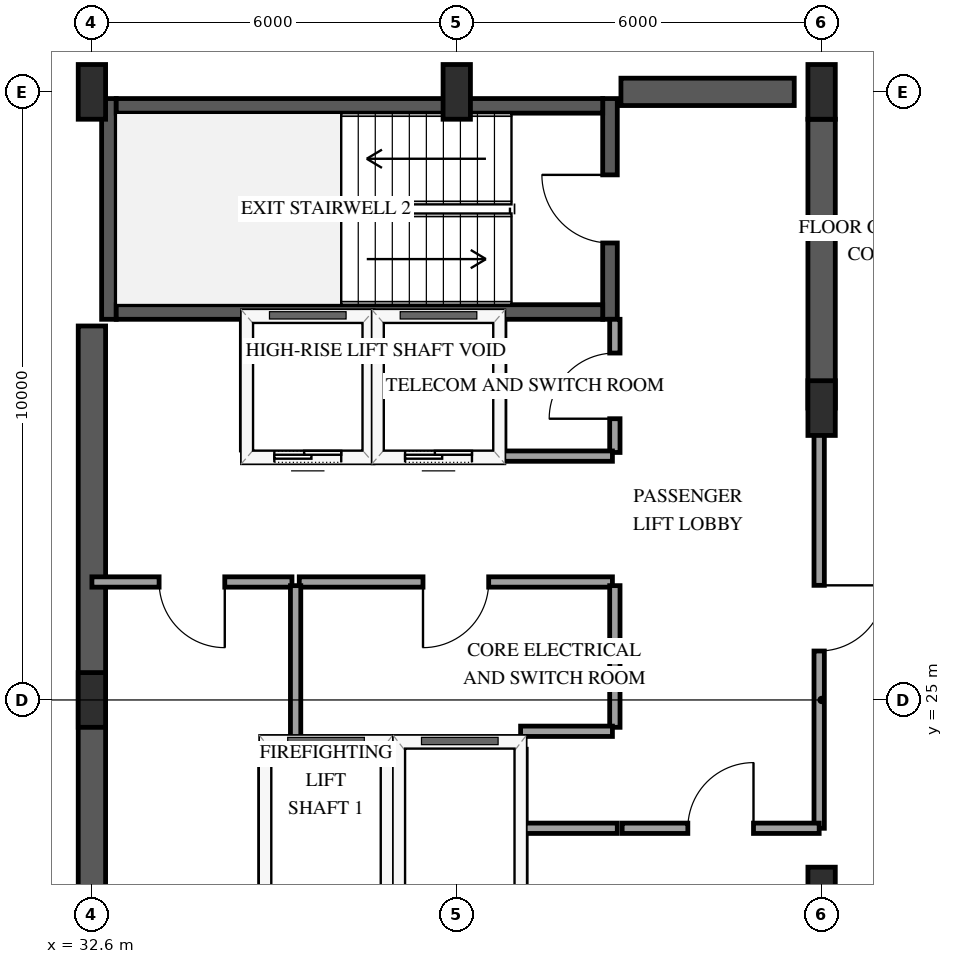
"""IFC4 building model, lengths in metres.
Left out: names, types, materials, properties, quantities, classifications, styles, units other than length and angle.
Written with IfcOpenShell. Run it as: python <this file> out.ifc"""

import sys

from ifc_helpers import new_model, si_unit, direction, frame, frame_2d, origin, origin_2d, place, context, subcontext, project, spatial, rectangle, extrude, element, fill, save


model = new_model("IFC4")
c1 = context("Model", 3, precision=1e-05, world=origin(), true_north=direction((0.0, 1.0)))
c2 = subcontext(c1, "Body", "Model", "MODEL_VIEW")
j1 = project(units=[si_unit("LENGTHUNIT", "METRE"), si_unit("PLANEANGLEUNIT", "RADIAN")], contexts=[c1])
p1 = place(None, origin())
s1 = spatial("IfcSite", under=j1, at=p1, CompositionType="ELEMENT")
p2 = place(p1, origin())
s2 = spatial("IfcBuilding", under=s1, at=p2, CompositionType="ELEMENT")
p3 = place(p2, frame((0.0, 0.0, 250.0)))
s3 = spatial("IfcBuildingStorey", under=s2, at=p3, CompositionType="ELEMENT", Elevation=250.0)
p4 = place(p3, frame((32.88, 31.26, 0.0), z_axis=(0.0, 0.0, 1.0), x_axis=(0.0, 1.0, 0.0)))
e1 = element("IfcWall", 1, at=p4, inside=s3, PredefinedType="SHEAR", context=c2, shape_type="SweptSolid", body=[
    extrude(rectangle(XDim=3.63, YDim=0.24, at=frame_2d((1.815, 0.0))), origin(), (0.0, 0.0, 1.0), 3.75),
])
p5 = place(p3, frame((41.12, 31.26, 0.0), z_axis=(0.0, 0.0, 1.0), x_axis=(0.0, 1.0, 0.0)))
e2 = element("IfcWall", 2, at=p5, inside=s3, PredefinedType="SHEAR", context=c2, shape_type="SweptSolid", body=[
    extrude(rectangle(XDim=3.63, YDim=0.24, at=frame_2d((1.815, 0.0))), origin(), (0.0, 0.0, 1.0), 3.75),
])
p6 = place(p5, frame((1.255, 0.0, 0.0)))
e3 = element("IfcOpeningElement", 3, at=p6, cuts=e2, PredefinedType="OPENING", context=c2, shape_type="SweptSolid", body=[
    extrude(rectangle(XDim=1.12, YDim=2.15, at=frame_2d((0.56, 1.075))), frame((0.0, 0.13, 0.0), z_axis=(0.0, -1.0, 0.0), x_axis=(1.0, 0.0, 0.0)), (0.0, 0.0, 1.0), 0.26),
])
for number, where, z_axis, x_axis in (
    (4, (33.0, 31.38, 0.0), (0.0, 0.0, 1.0), (1.0, 0.0, 0.0)),
    (5, (33.0, 34.77, 0.0), (0.0, 0.0, 1.0), (1.0, 0.0, 0.0)),
):
    element("IfcWall", number, at=place(p3, frame(where, z_axis=z_axis, x_axis=x_axis)), inside=s3, PredefinedType="SHEAR", context=c2, shape_type="SweptSolid", body=[
        extrude(rectangle(XDim=8.0, YDim=0.24, at=frame_2d((4.0, 0.0))), origin(), (0.0, 0.0, 1.0), 3.75),
    ])
p7 = place(p3, frame((32.6, 18.85, 0.0), z_axis=(0.0, 0.0, 1.0), x_axis=(0.0, 1.0, 0.0)))
e6 = element("IfcWall", 6, at=p7, inside=s3, PredefinedType="SHEAR", context=c2, shape_type="SweptSolid", body=[
    extrude(rectangle(XDim=12.3, YDim=0.45, at=frame_2d((6.15, 0.0))), origin(), (0.0, 0.0, 1.0), 3.75),
])
p8 = place(p3, frame((41.3, 35.0, 0.0), z_axis=(0.0, 0.0, 1.0), x_axis=(1.0, 0.0, 0.0)))
e7 = element("IfcWall", 7, at=p8, inside=s3, PredefinedType="SHEAR", context=c2, shape_type="SweptSolid", body=[
    extrude(rectangle(XDim=2.85, YDim=0.45, at=frame_2d((1.425, 0.0))), origin(), (0.0, 0.0, 1.0), 3.75),
])
p9 = place(p3, frame((44.6, 29.8, 0.0), z_axis=(0.0, 0.0, 1.0), x_axis=(0.0, 1.0, 0.0)))
e8 = element("IfcWall", 8, at=p9, inside=s3, PredefinedType="SHEAR", context=c2, shape_type="SweptSolid", body=[
    extrude(rectangle(XDim=4.75, YDim=0.45, at=frame_2d((2.375, 0.0))), origin(), (0.0, 0.0, 1.0), 3.75),
])
for number, where, z_axis, x_axis in (
    (9, (32.6, 25.0, 0.0), (0.0, 0.0, 1.0), (1.0, 0.0, 0.0)),
    (10, (32.6, 35.0, 0.0), (0.0, 0.0, 1.0), (1.0, 0.0, 0.0)),
    (11, (38.6, 35.0, 0.0), (0.0, 0.0, 1.0), (1.0, 0.0, 0.0)),
    (12, (44.6, 21.8, 0.0), (0.0, 0.0, 1.0), (1.0, 0.0, 0.0)),
    (13, (44.6, 29.8, 0.0), (0.0, 0.0, 1.0), (1.0, 0.0, 0.0)),
    (14, (44.6, 35.0, 0.0), (0.0, 0.0, 1.0), (1.0, 0.0, 0.0)),
):
    element("IfcColumn", number, at=place(p3, frame(where, z_axis=z_axis, x_axis=x_axis)), inside=s3, PredefinedType="PILASTER", context=c2, shape_type="SweptSolid", body=[
        extrude(rectangle(XDim=0.45, YDim=0.9, at=origin_2d()), origin(), (0.0, 0.0, 1.0), 3.75),
    ])
p10 = place(p3, frame((35.45, 24.3, 0.0), z_axis=(0.0, 0.0, 1.0), x_axis=(1.0, 0.0, 0.0)))
e15 = element("IfcWall", 15, at=p10, inside=s3, PredefinedType="SOLIDWALL", context=c2, shape_type="SweptSolid", body=[
    extrude(rectangle(XDim=2.0, YDim=0.185, at=frame_2d((1.0, 0.0))), origin(), (0.0, 0.0, 1.0), 2.824),
])
for number, where, z_axis, x_axis in (
    (16, (35.45, 21.81, 0.0), (0.0, 0.0, 1.0), (0.0, 1.0, 0.0)),
    (17, (37.45, 21.81, 0.0), (0.0, 0.0, 1.0), (0.0, 1.0, 0.0)),
):
    element("IfcWall", number, at=place(p3, frame(where, z_axis=z_axis, x_axis=x_axis)), inside=s3, PredefinedType="SOLIDWALL", context=c2, shape_type="SweptSolid", body=[
        extrude(rectangle(XDim=2.38, YDim=0.185, at=frame_2d((1.19, 0.0))), origin(), (0.0, 0.0, 1.0), 3.45),
    ])
p11 = place(p3, frame((37.65, 24.3, 0.0), z_axis=(0.0, 0.0, 1.0), x_axis=(1.0, 0.0, 0.0)))
e18 = element("IfcWall", 18, at=p11, inside=s3, PredefinedType="SOLIDWALL", context=c2, shape_type="SweptSolid", body=[
    extrude(rectangle(XDim=2.0, YDim=0.185, at=frame_2d((1.0, 0.0))), origin(), (0.0, 0.0, 1.0), 2.824),
])
p12 = place(p3, frame((39.65, 21.81, 0.0), z_axis=(0.0, 0.0, 1.0), x_axis=(0.0, 1.0, 0.0)))
e19 = element("IfcWall", 19, at=p12, inside=s3, PredefinedType="SOLIDWALL", context=c2, shape_type="SweptSolid", body=[
    extrude(rectangle(XDim=2.38, YDim=0.185, at=frame_2d((1.19, 0.0))), origin(), (0.0, 0.0, 1.0), 3.45),
])
p13 = place(p3, frame((35.15, 29.0, 0.0), z_axis=(0.0, 0.0, 1.0), x_axis=(1.0, 0.0, 0.0)))
e20 = element("IfcWall", 20, at=p13, inside=s3, PredefinedType="SOLIDWALL", context=c2, shape_type="SweptSolid", body=[
    extrude(rectangle(XDim=2.0, YDim=0.185, at=frame_2d((1.0, 0.0))), origin(), (0.0, 0.0, 1.0), 3.45),
])
p14 = place(p13, frame((0.45, 0.0, 0.0)))
e21 = element("IfcOpeningElement", 21, at=p14, cuts=e20, PredefinedType="OPENING", context=c2, shape_type="SweptSolid", body=[
    extrude(rectangle(XDim=1.1, YDim=2.15, at=frame_2d((0.55, 1.075))), frame((0.0, 0.103, 0.0), z_axis=(0.0, -1.0, 0.0), x_axis=(1.0, 0.0, 0.0)), (0.0, 0.0, 1.0), 0.205),
])
for number, where, z_axis, x_axis in (
    (22, (35.15, 29.11, 0.0), (0.0, 0.0, 1.0), (0.0, 1.0, 0.0)),
    (23, (37.15, 29.11, 0.0), (0.0, 0.0, 1.0), (0.0, 1.0, 0.0)),
):
    element("IfcWall", number, at=place(p3, frame(where, z_axis=z_axis, x_axis=x_axis)), inside=s3, PredefinedType="SOLIDWALL", context=c2, shape_type="SweptSolid", body=[
        extrude(rectangle(XDim=2.1, YDim=0.185, at=frame_2d((1.05, 0.0))), origin(), (0.0, 0.0, 1.0), 3.45),
    ])
p15 = place(p3, frame((37.3, 29.0, 0.0), z_axis=(0.0, 0.0, 1.0), x_axis=(1.0, 0.0, 0.0)))
e24 = element("IfcWall", 24, at=p15, inside=s3, PredefinedType="SOLIDWALL", context=c2, shape_type="SweptSolid", body=[
    extrude(rectangle(XDim=2.0, YDim=0.185, at=frame_2d((1.0, 0.0))), origin(), (0.0, 0.0, 1.0), 3.45),
])
p16 = place(p15, frame((0.45, 0.0, 0.0)))
e25 = element("IfcOpeningElement", 25, at=p16, cuts=e24, PredefinedType="OPENING", context=c2, shape_type="SweptSolid", body=[
    extrude(rectangle(XDim=1.1, YDim=2.15, at=frame_2d((0.55, 1.075))), frame((0.0, 0.103, 0.0), z_axis=(0.0, -1.0, 0.0), x_axis=(1.0, 0.0, 0.0)), (0.0, 0.0, 1.0), 0.205),
])
p17 = place(p3, frame((39.3, 29.11, 0.0), z_axis=(0.0, 0.0, 1.0), x_axis=(0.0, 1.0, 0.0)))
e26 = element("IfcWall", 26, at=p17, inside=s3, PredefinedType="SOLIDWALL", context=c2, shape_type="SweptSolid", body=[
    extrude(rectangle(XDim=2.1, YDim=0.185, at=frame_2d((1.05, 0.0))), origin(), (0.0, 0.0, 1.0), 3.45),
])
p18 = place(p3, frame((44.56, 29.8, 0.0), z_axis=(0.0, 0.0, 1.0), x_axis=(0.0, -1.0, 0.0)))
e27 = element("IfcWall", 27, at=p18, inside=s3, PredefinedType="PARTITIONING", context=c2, shape_type="SweptSolid", body=[
    extrude(rectangle(XDim=6.91, YDim=0.17, at=frame_2d((3.455, 0.0))), origin(), (0.0, 0.0, 1.0), 2.49),
])
p19 = place(p18, frame((2.915, 0.0, 0.0)))
e28 = element("IfcOpeningElement", 28, at=p19, cuts=e27, PredefinedType="OPENING", context=c2, shape_type="SweptSolid", body=[
    extrude(rectangle(XDim=1.08, YDim=2.15, at=frame_2d((0.54, 1.075))), frame((0.0, 0.095, 0.0), z_axis=(0.0, -1.0, 0.0), x_axis=(1.0, 0.0, 0.0)), (0.0, 0.0, 1.0), 0.19),
])
p20 = place(p3, frame((41.16, 26.94, 0.0), z_axis=(0.0, 0.0, 1.0), x_axis=(-1.0, 0.0, 0.0)))
e29 = element("IfcWall", 29, at=p20, inside=s3, PredefinedType="PARTITIONING", context=c2, shape_type="SweptSolid", body=[
    extrude(rectangle(XDim=5.15, YDim=0.17, at=frame_2d((2.575, 0.0))), origin(), (0.0, 0.0, 1.0), 3.45),
])
p21 = place(p20, frame((2.035, 0.0, 0.0)))
e30 = element("IfcOpeningElement", 30, at=p21, cuts=e29, PredefinedType="OPENING", context=c2, shape_type="SweptSolid", body=[
    extrude(rectangle(XDim=1.08, YDim=2.15, at=frame_2d((0.54, 1.075))), frame((0.0, 0.095, 0.0), z_axis=(0.0, -1.0, 0.0), x_axis=(1.0, 0.0, 0.0)), (0.0, 0.0, 1.0), 0.19),
])
p22 = place(p3, frame((35.89, 26.94, 0.0), z_axis=(0.0, 0.0, 1.0), x_axis=(-1.0, 0.0, 0.0)))
e31 = element("IfcWall", 31, at=p22, inside=s3, PredefinedType="PARTITIONING", context=c2, shape_type="SweptSolid", body=[
    extrude(rectangle(XDim=3.29, YDim=0.17, at=frame_2d((1.645, 0.0))), origin(), (0.0, 0.0, 1.0), 3.45),
])
p23 = place(p22, frame((1.105, 0.0, 0.0)))
e32 = element("IfcOpeningElement", 32, at=p23, cuts=e31, PredefinedType="OPENING", context=c2, shape_type="SweptSolid", body=[
    extrude(rectangle(XDim=1.08, YDim=2.15, at=frame_2d((0.54, 1.075))), frame((0.0, 0.095, 0.0), z_axis=(0.0, -1.0, 0.0), x_axis=(1.0, 0.0, 0.0)), (0.0, 0.0, 1.0), 0.19),
])
p24 = place(p3, frame((41.32, 22.89, 0.0), z_axis=(0.0, 0.0, 1.0), x_axis=(1.0, 0.0, 0.0)))
e33 = element("IfcWall", 33, at=p24, inside=s3, PredefinedType="PARTITIONING", context=c2, shape_type="SweptSolid", body=[
    extrude(rectangle(XDim=3.24, YDim=0.17, at=frame_2d((1.62, 0.0))), origin(), (0.0, 0.0, 1.0), 3.45),
])
p25 = place(p24, frame((1.08, 0.0, 0.0)))
e34 = element("IfcOpeningElement", 34, at=p25, cuts=e33, PredefinedType="OPENING", context=c2, shape_type="SweptSolid", body=[
    extrude(rectangle(XDim=1.08, YDim=2.15, at=frame_2d((0.54, 1.075))), frame((0.0, 0.095, 0.0), z_axis=(0.0, -1.0, 0.0), x_axis=(1.0, 0.0, 0.0)), (0.0, 0.0, 1.0), 0.19),
])
p26 = place(p3, frame((35.95, 26.88, 0.0), z_axis=(0.0, 0.0, 1.0), x_axis=(0.0, -1.0, 0.0)))
e35 = element("IfcWall", 35, at=p26, inside=s3, PredefinedType="PARTITIONING", context=c2, shape_type="SweptSolid", body=[
    extrude(rectangle(XDim=2.58, YDim=0.17, at=frame_2d((1.29, 0.0))), origin(), (0.0, 0.0, 1.0), 3.45),
])
p27 = place(p3, frame((41.2, 24.55, 0.0), z_axis=(0.0, 0.0, 1.0), x_axis=(0.0, 1.0, 0.0)))
e36 = element("IfcWall", 36, at=p27, inside=s3, PredefinedType="PARTITIONING", context=c2, shape_type="SweptSolid", body=[
    extrude(rectangle(XDim=2.33, YDim=0.17, at=frame_2d((1.165, 0.0))), origin(), (0.0, 0.0, 1.0), 3.45),
])
p28 = place(p3, frame((41.2, 29.07, 0.0), z_axis=(0.0, 0.0, 1.0), x_axis=(0.0, 1.0, 0.0)))
e37 = element("IfcWall", 37, at=p28, inside=s3, PredefinedType="PARTITIONING", context=c2, shape_type="SweptSolid", body=[
    extrude(rectangle(XDim=2.19, YDim=0.17, at=frame_2d((1.095, 0.0))), origin(), (0.0, 0.0, 1.0), 3.45),
])
p29 = place(p28, frame((0.555, 0.0, 0.0)))
e38 = element("IfcOpeningElement", 38, at=p29, cuts=e37, PredefinedType="OPENING", context=c2, shape_type="SweptSolid", body=[
    extrude(rectangle(XDim=1.08, YDim=2.15, at=frame_2d((0.54, 1.075))), frame((0.0, 0.095, 0.0), z_axis=(0.0, -1.0, 0.0), x_axis=(1.0, 0.0, 0.0)), (0.0, 0.0, 1.0), 0.19),
])
p30 = place(p3, frame((39.3, 29.01, 0.0), z_axis=(0.0, 0.0, 1.0), x_axis=(1.0, 0.0, 0.0)))
e39 = element("IfcWall", 39, at=p30, inside=s3, PredefinedType="PARTITIONING", context=c2, shape_type="SweptSolid", body=[
    extrude(rectangle(XDim=1.86, YDim=0.17, at=frame_2d((0.93, 0.0))), origin(), (0.0, 0.0, 1.0), 3.45),
])
p31 = place(p3, frame((39.72, 22.89, 0.0), z_axis=(0.0, 0.0, 1.0), x_axis=(1.0, 0.0, 0.0)))
e40 = element("IfcWall", 40, at=p31, inside=s3, PredefinedType="PARTITIONING", context=c2, shape_type="SweptSolid", body=[
    extrude(rectangle(XDim=1.52, YDim=0.17, at=frame_2d((0.76, 0.0))), origin(), (0.0, 0.0, 1.0), 3.45),
])
p32 = place(p3, frame((39.65, 24.485, 0.0), z_axis=(0.0, 0.0, 1.0), x_axis=(1.0, 0.0, 0.0)))
e41 = element("IfcWall", 41, at=p32, inside=s3, PredefinedType="PARTITIONING", context=c2, shape_type="SweptSolid", body=[
    extrude(rectangle(XDim=1.51, YDim=0.17, at=frame_2d((0.755, 0.0))), origin(), (0.0, 0.0, 1.0), 2.824),
])
p33 = place(p14, origin())
e42 = element("IfcDoor", 42, at=p33, inside=s3, OperationType="SLIDING_TO_LEFT", PredefinedType="DOOR", context=c2, shape_type="SweptSolid", body=[
    extrude(rectangle(XDim=1.1, YDim=2.15, at=frame_2d((0.55, 1.075))), frame((0.0, 0.025, 0.0), z_axis=(0.0, -1.0, 0.0), x_axis=(1.0, 0.0, 0.0)), (0.0, 0.0, 1.0), 0.05),
])
fill(e21, e42)
p34 = place(p16, origin())
e43 = element("IfcDoor", 43, at=p34, inside=s3, OperationType="SLIDING_TO_LEFT", PredefinedType="DOOR", context=c2, shape_type="SweptSolid", body=[
    extrude(rectangle(XDim=1.1, YDim=2.15, at=frame_2d((0.55, 1.075))), frame((0.0, 0.025, 0.0), z_axis=(0.0, -1.0, 0.0), x_axis=(1.0, 0.0, 0.0)), (0.0, 0.0, 1.0), 0.05),
])
fill(e25, e43)
p35 = place(p6, origin())
e44 = element("IfcDoor", 44, at=p35, inside=s3, OperationType="SINGLE_SWING_RIGHT", PredefinedType="DOOR", context=c2, shape_type="SweptSolid", body=[
    extrude(rectangle(XDim=1.12, YDim=2.15, at=frame_2d((0.56, 1.075))), frame((0.0, 0.025, 0.0), z_axis=(0.0, -1.0, 0.0), x_axis=(1.0, 0.0, 0.0)), (0.0, 0.0, 1.0), 0.05),
])
fill(e3, e44)
p36 = place(p19, origin())
e45 = element("IfcDoor", 45, at=p36, inside=s3, OperationType="SINGLE_SWING_LEFT", PredefinedType="DOOR", context=c2, shape_type="SweptSolid", body=[
    extrude(rectangle(XDim=1.08, YDim=2.15, at=frame_2d((0.54, 1.075))), frame((0.0, 0.025, 0.0), z_axis=(0.0, -1.0, 0.0), x_axis=(1.0, 0.0, 0.0)), (0.0, 0.0, 1.0), 0.05),
])
fill(e28, e45)
p37 = place(p21, origin())
e46 = element("IfcDoor", 46, at=p37, inside=s3, OperationType="SINGLE_SWING_RIGHT", PredefinedType="DOOR", context=c2, shape_type="SweptSolid", body=[
    extrude(rectangle(XDim=1.08, YDim=2.15, at=frame_2d((0.54, 1.075))), frame((0.0, 0.025, 0.0), z_axis=(0.0, -1.0, 0.0), x_axis=(1.0, 0.0, 0.0)), (0.0, 0.0, 1.0), 0.05),
])
fill(e30, e46)
p38 = place(p23, origin())
e47 = element("IfcDoor", 47, at=p38, inside=s3, OperationType="SINGLE_SWING_LEFT", PredefinedType="DOOR", context=c2, shape_type="SweptSolid", body=[
    extrude(rectangle(XDim=1.08, YDim=2.15, at=frame_2d((0.54, 1.075))), frame((0.0, 0.025, 0.0), z_axis=(0.0, -1.0, 0.0), x_axis=(1.0, 0.0, 0.0)), (0.0, 0.0, 1.0), 0.05),
])
fill(e32, e47)
p39 = place(p25, origin())
e48 = element("IfcDoor", 48, at=p39, inside=s3, OperationType="SINGLE_SWING_RIGHT", PredefinedType="DOOR", context=c2, shape_type="SweptSolid", body=[
    extrude(rectangle(XDim=1.08, YDim=2.15, at=frame_2d((0.54, 1.075))), frame((0.0, 0.025, 0.0), z_axis=(0.0, -1.0, 0.0), x_axis=(1.0, 0.0, 0.0)), (0.0, 0.0, 1.0), 0.05),
])
fill(e34, e48)
p40 = place(p29, origin())
e49 = element("IfcDoor", 49, at=p40, inside=s3, OperationType="SINGLE_SWING_LEFT", PredefinedType="DOOR", context=c2, shape_type="SweptSolid", body=[
    extrude(rectangle(XDim=1.08, YDim=2.15, at=frame_2d((0.54, 1.075))), frame((0.0, 0.025, 0.0), z_axis=(0.0, -1.0, 0.0), x_axis=(1.0, 0.0, 0.0)), (0.0, 0.0, 1.0), 0.05),
])
fill(e38, e49)
save(model, sys.argv[1])
